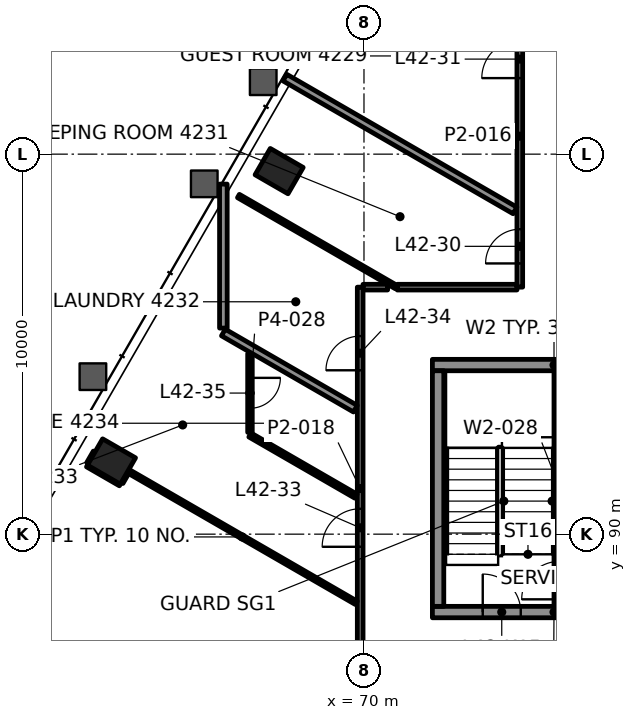
"""IFC4 building model, lengths in metres.
Left out: names, types, materials, properties, quantities, classifications, styles, units other than length and angle.
Written with IfcOpenShell. Run it as: python <this file> out.ifc"""

import sys

from ifc_helpers import new_model, si_unit, direction, frame, frame_2d, origin, origin_2d, place, context, subcontext, project, spatial, rectangle, hollow_rectangle, extrude, element, fill, save


model = new_model("IFC4")
c1 = context("Model", 3, precision=1e-05, world=origin(), true_north=direction((0.0, 1.0)))
c2 = subcontext(c1, "Body", "Model", "MODEL_VIEW")
j1 = project(units=[si_unit("LENGTHUNIT", "METRE"), si_unit("PLANEANGLEUNIT", "RADIAN")], contexts=[c1])
p1 = place(None, origin())
s1 = spatial("IfcSite", under=j1, at=p1, CompositionType="ELEMENT")
p2 = place(p1, origin())
s2 = spatial("IfcBuilding", under=s1, at=p2, CompositionType="ELEMENT")
p3 = place(p2, frame((0.0, 0.0, 183.1)))
s3 = spatial("IfcBuildingStorey", under=s2, at=p3, CompositionType="ELEMENT", Elevation=183.1)
for number, where, z_axis, x_axis in (
    (1, (67.768, 99.553, -0.0), (0.0, 0.0, 1.0), (-0.5, -0.866, 0.0)),
    (2, (63.355, 91.912, -0.0), (0.0, 0.0, 1.0), (-0.5, -0.866, 0.0)),
):
    element("IfcColumn", number, at=place(p3, frame(where, z_axis=z_axis, x_axis=x_axis)), inside=s3, PredefinedType="COLUMN", context=c2, shape_type="SweptSolid", body=[
        extrude(hollow_rectangle(XDim=0.8, YDim=1.0, WallThickness=0.05, at=origin_2d()), origin(), (0.0, 0.0, 1.0), 3.9),
    ])
p4 = place(p3, frame((71.8, 87.95, 0.0), z_axis=(0.0, 0.0, 1.0), x_axis=(1.0, 0.0, 0.0)))
e3 = element("IfcWall", 3, at=p4, inside=s3, PredefinedType="SHEAR", context=c2, shape_type="SweptSolid", body=[
    extrude(rectangle(XDim=6.4, YDim=0.3, at=frame_2d((3.2, 0.0))), origin(), (0.0, 0.0, 1.0), 3.7),
])
p5 = place(p4, frame((1.325, 0.0, 0.0)))
e4 = element("IfcOpeningElement", 4, at=p5, cuts=e3, PredefinedType="OPENING", context=c2, shape_type="SweptSolid", body=[
    extrude(rectangle(XDim=1.0, YDim=2.1, at=frame_2d((0.5, 1.05))), frame((0.0, 0.16, 0.0), z_axis=(0.0, -1.0, 0.0), x_axis=(1.0, 0.0, 0.0)), (0.0, 0.0, 1.0), 0.32),
])
p6 = place(p4, frame((4.125, 0.0, 0.0)))
e5 = element("IfcOpeningElement", 5, at=p6, cuts=e3, PredefinedType="OPENING", context=c2, shape_type="SweptSolid", body=[
    extrude(rectangle(XDim=1.2, YDim=2.1, at=frame_2d((0.6, 1.05))), frame((0.0, 0.16, 0.0), z_axis=(0.0, -1.0, 0.0), x_axis=(1.0, 0.0, 0.0)), (0.0, 0.0, 1.0), 0.32),
])
p7 = place(p3, frame((71.8, 94.45, 0.0), z_axis=(0.0, 0.0, 1.0), x_axis=(1.0, 0.0, 0.0)))
e6 = element("IfcWall", 6, at=p7, inside=s3, PredefinedType="SHEAR", context=c2, shape_type="SweptSolid", body=[
    extrude(rectangle(XDim=6.4, YDim=0.3, at=frame_2d((3.2, 0.0))), origin(), (0.0, 0.0, 1.0), 3.7),
])
p8 = place(p3, frame((71.95, 88.1, 0.0), z_axis=(0.0, 0.0, 1.0), x_axis=(0.0, 1.0, 0.0)))
e7 = element("IfcWall", 7, at=p8, inside=s3, PredefinedType="SHEAR", context=c2, shape_type="SweptSolid", body=[
    extrude(rectangle(XDim=6.2, YDim=0.3, at=frame_2d((3.1, 0.0))), origin(), (0.0, 0.0, 1.0), 3.7),
])
p9 = place(p3, frame((75.15, 88.1, 0.0), z_axis=(0.0, 0.0, 1.0), x_axis=(0.0, 1.0, 0.0)))
e8 = element("IfcWall", 8, at=p9, inside=s3, PredefinedType="SHEAR", context=c2, shape_type="SweptSolid", body=[
    extrude(rectangle(XDim=6.2, YDim=0.3, at=frame_2d((3.1, 0.0))), origin(), (0.0, 0.0, 1.0), 3.7),
])
p10 = place(p9, frame((0.185, 0.0, 0.0)))
e9 = element("IfcOpeningElement", 9, at=p10, cuts=e8, PredefinedType="OPENING", context=c2, shape_type="SweptSolid", body=[
    extrude(rectangle(XDim=1.0, YDim=2.1, at=frame_2d((0.5, 1.05))), frame((0.0, 0.16, 0.0), z_axis=(0.0, -1.0, 0.0), x_axis=(1.0, 0.0, 0.0)), (0.0, 0.0, 1.0), 0.32),
])
p11 = place(p3, frame((69.975, 96.5, 0.0), z_axis=(0.0, 0.0, 1.0), x_axis=(1.0, 0.0, 0.0)))
e10 = element("IfcWall", 10, at=p11, inside=s3, PredefinedType="PARTITIONING", context=c2, shape_type="SweptSolid", body=[
    extrude(rectangle(XDim=0.646, YDim=0.15, at=frame_2d((0.323, 0.0))), origin(), (0.0, 0.0, 1.0), 3.1),
])
p12 = place(p3, frame((63.614, 91.359, 0.0), z_axis=(0.0, 0.0, 1.0), x_axis=(0.499557828523, 0.866280541142, 0.0)))
e11 = element("IfcWall", 11, at=p12, inside=s3, PredefinedType="PARTITIONING", context=c2, shape_type="SweptSolid", body=[
    extrude(rectangle(XDim=0.3, YDim=0.1, at=frame_2d((0.15, 0.0))), origin(), (0.0, 0.0, 1.0), 3.022),
])
p13 = place(p3, frame((62.748, 91.859, 0.0), z_axis=(0.0, 0.0, 1.0), x_axis=(0.500044870432, 0.865999496279, 0.0)))
e12 = element("IfcWall", 12, at=p13, inside=s3, PredefinedType="PARTITIONING", context=c2, shape_type="SweptSolid", body=[
    extrude(rectangle(XDim=0.35, YDim=0.1, at=frame_2d((0.175, 0.0))), origin(), (0.0, 0.0, 1.0), 3.1),
])
p14 = place(p3, frame((74.1, 96.5, 0.0), z_axis=(0.0, 0.0, 1.0), x_axis=(0.0, 1.0, 0.0)))
e13 = element("IfcWall", 13, at=p14, inside=s3, PredefinedType="PARTITIONING", context=c2, shape_type="SweptSolid", body=[
    extrude(rectangle(XDim=7.945, YDim=0.15, at=frame_2d((3.973, 0.0))), origin(), (0.0, 0.0, 1.0), 3.1),
])
p15 = place(p14, frame((0.624, 0.0, 0.0)))
e14 = element("IfcOpeningElement", 14, at=p15, cuts=e13, PredefinedType="OPENING", context=c2, shape_type="SweptSolid", body=[
    extrude(rectangle(XDim=0.9, YDim=2.1, at=frame_2d((0.45, 1.05))), frame((0.0, 0.085, 0.0), z_axis=(0.0, -1.0, 0.0), x_axis=(1.0, 0.0, 0.0)), (0.0, 0.0, 1.0), 0.17),
])
p16 = place(p14, frame((5.501, 0.0, 0.0)))
e15 = element("IfcOpeningElement", 15, at=p16, cuts=e13, PredefinedType="OPENING", context=c2, shape_type="SweptSolid", body=[
    extrude(rectangle(XDim=1.0, YDim=2.1, at=frame_2d((0.5, 1.05))), frame((0.0, 0.085, 0.0), z_axis=(0.0, -1.0, 0.0), x_axis=(1.0, 0.0, 0.0)), (0.0, 0.0, 1.0), 0.17),
])
p17 = place(p3, frame((69.9, 85.9, 0.0), z_axis=(0.0, 0.0, 1.0), x_axis=(0.0, 1.0, 0.0)))
e16 = element("IfcWall", 16, at=p17, inside=s3, PredefinedType="PARTITIONING", context=c2, shape_type="SweptSolid", body=[
    extrude(rectangle(XDim=10.6, YDim=0.15, at=frame_2d((5.3, 0.0))), origin(), (0.0, 0.0, 1.0), 3.022),
])
p18 = place(p17, frame((3.767, 0.0, 0.0)))
e17 = element("IfcOpeningElement", 17, at=p18, cuts=e16, PredefinedType="OPENING", context=c2, shape_type="SweptSolid", body=[
    extrude(rectangle(XDim=1.0, YDim=2.1, at=frame_2d((0.5, 1.05))), frame((0.0, 0.085, 0.0), z_axis=(0.0, -1.0, 0.0), x_axis=(1.0, 0.0, 0.0)), (0.0, 0.0, 1.0), 0.17),
])
p19 = place(p17, frame((8.412, 0.0, 0.0)))
e18 = element("IfcOpeningElement", 18, at=p19, cuts=e16, PredefinedType="OPENING", context=c2, shape_type="SweptSolid", body=[
    extrude(rectangle(XDim=0.9, YDim=2.1, at=frame_2d((0.45, 1.05))), frame((0.0, 0.085, 0.0), z_axis=(0.0, -1.0, 0.0), x_axis=(1.0, 0.0, 0.0)), (0.0, 0.0, 1.0), 0.17),
])
p20 = place(p3, frame((67.0, 94.747, 0.0), z_axis=(0.0, 0.0, 1.0), x_axis=(0.0, -1.0, 0.0)))
e19 = element("IfcWall", 19, at=p20, inside=s3, PredefinedType="PARTITIONING", context=c2, shape_type="SweptSolid", body=[
    extrude(rectangle(XDim=2.068, YDim=0.12, at=frame_2d((1.034, 0.0))), origin(), (0.0, 0.0, 1.0), 3.1),
])
p21 = place(p20, frame((0.634, 0.0, 0.0)))
e20 = element("IfcOpeningElement", 20, at=p21, cuts=e19, PredefinedType="OPENING", context=c2, shape_type="SweptSolid", body=[
    extrude(rectangle(XDim=0.8, YDim=2.1, at=frame_2d((0.4, 1.05))), frame((0.0, 0.07, 0.0), z_axis=(0.0, -1.0, 0.0), x_axis=(1.0, 0.0, 0.0)), (0.0, 0.0, 1.0), 0.14),
])
p22 = place(p3, frame((66.3, 95.423, 0.0), z_axis=(0.0, 0.0, 1.0), x_axis=(0.0, 1.0, 0.0)))
e21 = element("IfcWall", 21, at=p22, inside=s3, PredefinedType="PARTITIONING", context=c2, shape_type="SweptSolid", body=[
    extrude(rectangle(XDim=3.789, YDim=0.2, at=frame_2d((1.895, 0.0))), origin(), (0.0, 0.0, 1.0), 3.022),
])
p23 = place(p3, frame((73.973, 98.518, 0.0), z_axis=(0.0, 0.0, 1.0), x_axis=(-0.866016957496, 0.500014629116, 0.0)))
e22 = element("IfcWall", 22, at=p23, inside=s3, PredefinedType="PARTITIONING", context=c2, shape_type="SweptSolid", body=[
    extrude(rectangle(XDim=6.992, YDim=0.2, at=frame_2d((3.496, 0.0))), origin(), (0.0, 0.0, 1.0), 3.1),
])
p24 = place(p3, frame((70.851, 96.5, 0.0), z_axis=(0.0, 0.0, 1.0), x_axis=(-0.866016914842, 0.500014702992, 0.0)))
e23 = element("IfcWall", 23, at=p24, inside=s3, PredefinedType="PARTITIONING", context=c2, shape_type="SweptSolid", body=[
    extrude(rectangle(XDim=4.797, YDim=0.1, at=frame_2d((2.398, 0.0))), origin(), (0.0, 0.0, 1.0), 3.022),
])
p25 = place(p3, frame((69.773, 93.302, 0.0), z_axis=(0.0, 0.0, 1.0), x_axis=(-0.866046692957, 0.499963124258, 0.0)))
e24 = element("IfcWall", 24, at=p25, inside=s3, PredefinedType="PARTITIONING", context=c2, shape_type="SweptSolid", body=[
    extrude(rectangle(XDim=4.01, YDim=0.2, at=frame_2d((2.005, 0.0))), origin(), (0.0, 0.0, 1.0), 3.1),
])
p26 = place(p3, frame((69.79, 90.998, 0.0), z_axis=(0.0, 0.0, 1.0), x_axis=(-0.866029130051, 0.499993545862, 0.0)))
e25 = element("IfcWall", 25, at=p26, inside=s3, PredefinedType="PARTITIONING", context=c2, shape_type="SweptSolid", body=[
    extrude(rectangle(XDim=3.222, YDim=0.12, at=frame_2d((1.611, 0.0))), origin(), (0.0, 0.0, 1.0), 3.1),
])
p27 = place(p3, frame((69.799, 88.192, 0.0), z_axis=(0.0, 0.0, 1.0), x_axis=(-0.866013353477, 0.500020871164, 0.0)))
e26 = element("IfcWall", 26, at=p27, inside=s3, PredefinedType="PARTITIONING", context=c2, shape_type="SweptSolid", body=[
    extrude(rectangle(XDim=6.94, YDim=0.1, at=frame_2d((3.47, 0.0))), origin(), (0.0, 0.0, 1.0), 3.022),
])
p28 = place(p3, frame((63.588, 91.316, 0.0), z_axis=(0.0, 0.0, 1.0), x_axis=(-0.866039090965, 0.499976292358, 0.0)))
e27 = element("IfcWall", 27, at=p28, inside=s3, PredefinedType="PARTITIONING", context=c2, shape_type="SweptSolid", body=[
    extrude(rectangle(XDim=0.999, YDim=0.1, at=frame_2d((0.5, 0.0))), origin(), (0.0, 0.0, 1.0), 3.022),
])
p29 = place(p3, frame((70.875, 96.5, 0.0), z_axis=(0.0, 0.0, 1.0), x_axis=(1.0, 0.0, 0.0)))
e28 = element("IfcWall", 28, at=p29, inside=s3, PredefinedType="PARTITIONING", context=c2, shape_type="SweptSolid", body=[
    extrude(rectangle(XDim=3.149, YDim=0.15, at=frame_2d((1.575, 0.0))), origin(), (0.0, 0.0, 1.0), 3.1),
])
p30 = place(p15, origin())
e29 = element("IfcDoor", 29, at=p30, inside=s3, OperationType="SINGLE_SWING_RIGHT", PredefinedType="DOOR", context=c2, shape_type="SweptSolid", body=[
    extrude(rectangle(XDim=0.9, YDim=2.1, at=frame_2d((0.45, 1.05))), frame((0.0, 0.025, 0.0), z_axis=(0.0, -1.0, 0.0), x_axis=(1.0, 0.0, 0.0)), (0.0, 0.0, 1.0), 0.05),
])
fill(e14, e29)
p31 = place(p16, origin())
e30 = element("IfcDoor", 30, at=p31, inside=s3, OperationType="SINGLE_SWING_RIGHT", PredefinedType="DOOR", context=c2, shape_type="SweptSolid", body=[
    extrude(rectangle(XDim=1.0, YDim=2.1, at=frame_2d((0.5, 1.05))), frame((0.0, 0.025, 0.0), z_axis=(0.0, -1.0, 0.0), x_axis=(1.0, 0.0, 0.0)), (0.0, 0.0, 1.0), 0.05),
])
fill(e15, e30)
p32 = place(p18, origin())
e31 = element("IfcDoor", 31, at=p32, inside=s3, OperationType="SINGLE_SWING_RIGHT", PredefinedType="DOOR", context=c2, shape_type="SweptSolid", body=[
    extrude(rectangle(XDim=1.0, YDim=2.1, at=frame_2d((0.5, 1.05))), frame((0.0, 0.025, 0.0), z_axis=(0.0, -1.0, 0.0), x_axis=(1.0, 0.0, 0.0)), (0.0, 0.0, 1.0), 0.05),
])
fill(e17, e31)
p33 = place(p19, origin())
e32 = element("IfcDoor", 32, at=p33, inside=s3, OperationType="SINGLE_SWING_LEFT", PredefinedType="DOOR", context=c2, shape_type="SweptSolid", body=[
    extrude(rectangle(XDim=0.9, YDim=2.1, at=frame_2d((0.45, 1.05))), frame((0.0, 0.025, 0.0), z_axis=(0.0, -1.0, 0.0), x_axis=(1.0, 0.0, 0.0)), (0.0, 0.0, 1.0), 0.05),
])
fill(e18, e32)
p34 = place(p21, origin())
e33 = element("IfcDoor", 33, at=p34, inside=s3, OperationType="SINGLE_SWING_RIGHT", PredefinedType="DOOR", context=c2, shape_type="SweptSolid", body=[
    extrude(rectangle(XDim=0.8, YDim=2.1, at=frame_2d((0.4, 1.05))), frame((0.0, 0.025, 0.0), z_axis=(0.0, -1.0, 0.0), x_axis=(1.0, 0.0, 0.0)), (0.0, 0.0, 1.0), 0.05),
])
fill(e20, e33)
p35 = place(p5, origin())
e34 = element("IfcDoor", 34, at=p35, inside=s3, OperationType="SINGLE_SWING_RIGHT", PredefinedType="DOOR", context=c2, shape_type="SweptSolid", body=[
    extrude(rectangle(XDim=1.0, YDim=2.1, at=frame_2d((0.5, 1.05))), frame((0.0, 0.025, 0.0), z_axis=(0.0, -1.0, 0.0), x_axis=(1.0, 0.0, 0.0)), (0.0, 0.0, 1.0), 0.05),
])
fill(e4, e34)
save(model, sys.argv[1])
